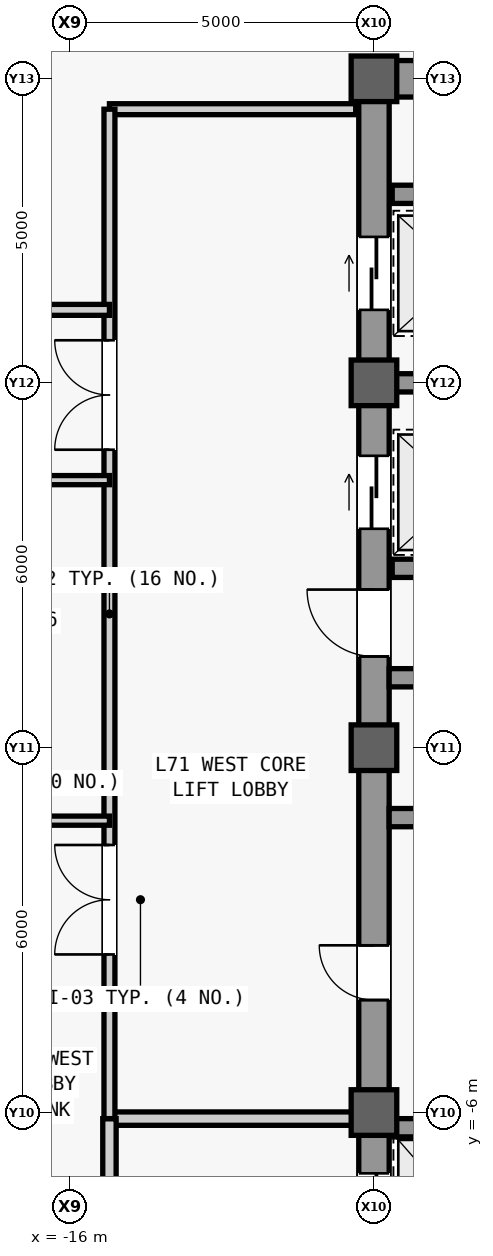
"""IFC4 building model, lengths in metres.
Left out: names, types, materials, properties, quantities, classifications, styles, units other than length and angle.
Written with IfcOpenShell. Run it as: python <this file> out.ifc"""

import sys

from ifc_helpers import new_model, si_unit, direction, frame, frame_2d, origin, origin_2d, place, context, subcontext, project, spatial, rectangle, extrude, source, transform, mapped, element, fill, save


model = new_model("IFC4")
c1 = context("Model", 3, precision=1e-05, world=origin(), true_north=direction((0.0, 1.0)))
c2 = subcontext(c1, "Body", "Model", "MODEL_VIEW")
j1 = project(units=[si_unit("LENGTHUNIT", "METRE"), si_unit("PLANEANGLEUNIT", "RADIAN")], contexts=[c1])
p1 = place(None, origin())
s1 = spatial("IfcSite", under=j1, at=p1, CompositionType="ELEMENT")
p2 = place(p1, origin())
s2 = spatial("IfcBuilding", under=s1, at=p2, CompositionType="ELEMENT")
p3 = place(p2, frame((0.0, 0.0, 301.5)))
s3 = spatial("IfcBuildingStorey", under=s2, at=p3, CompositionType="ELEMENT", Elevation=301.5)
m1 = source(origin(), c2, "Body", "SweptSolid", [
    extrude(rectangle(XDim=22.0, YDim=0.5, at=frame_2d((11.0, 0.0))), origin(), (0.0, 0.0, 1.0), 3.78),
])
p4 = place(p3, frame((-11.0, -11.0, 0.0), z_axis=(0.0, 0.0, 1.0), x_axis=(0.0, 1.0, 0.0)))
e1 = element("IfcWall", 1, at=p4, inside=s3, PredefinedType="SHEAR", context=c2, shape_type="MappedRepresentation", body=[
    mapped(m1, transform((0.0, 0.0, 0.0), scale=1.0)),
])
m2 = source(origin(), c2, "Body", "SweptSolid", [
    extrude(rectangle(XDim=1.1, YDim=2.2, at=frame_2d((0.55, 1.1))), frame((0.0, 0.26, 0.0), z_axis=(0.0, -1.0, 0.0), x_axis=(1.0, 0.0, 0.0)), (0.0, 0.0, 1.0), 0.52),
])
p5 = place(p4, frame((0.8, 0.0, 0.0)))
e2 = element("IfcOpeningElement", 2, at=p5, cuts=e1, PredefinedType="OPENING", context=c2, shape_type="MappedRepresentation", body=[
    mapped(m2, transform((0.0, 0.0, 0.0), scale=1.0)),
])
p6 = place(p4, frame((12.5, 0.0, 0.0)))
e3 = element("IfcOpeningElement", 3, at=p6, cuts=e1, PredefinedType="OPENING", context=c2, shape_type="MappedRepresentation", body=[
    mapped(m2, transform((0.0, 0.0, 0.0), scale=1.0)),
])
m3 = source(origin(), c2, "Body", "SweptSolid", [
    extrude(rectangle(XDim=0.9, YDim=2.15, at=frame_2d((0.45, 1.075))), frame((0.0, 0.26, 0.0), z_axis=(0.0, -1.0, 0.0), x_axis=(1.0, 0.0, 0.0)), (0.0, 0.0, 1.0), 0.52),
])
p7 = place(p4, frame((6.85, 0.0, 0.0)))
e4 = element("IfcOpeningElement", 4, at=p7, cuts=e1, PredefinedType="OPENING", context=c2, shape_type="MappedRepresentation", body=[
    mapped(m3, transform((0.0, 0.0, 0.0), scale=1.0)),
])
m4 = source(origin(), c2, "Body", "SweptSolid", [
    extrude(rectangle(XDim=1.2, YDim=2.3, at=frame_2d((0.6, 1.15))), frame((0.0, 0.26, 0.0), z_axis=(0.0, -1.0, 0.0), x_axis=(1.0, 0.0, 0.0)), (0.0, 0.0, 1.0), 0.52),
])
p8 = place(p4, frame((14.6, 0.0, 0.0)))
e5 = element("IfcOpeningElement", 5, at=p8, cuts=e1, PredefinedType="OPENING", context=c2, shape_type="MappedRepresentation", body=[
    mapped(m4, transform((0.0, 0.0, 0.0), scale=1.0)),
])
p9 = place(p4, frame((18.2, 0.0, 0.0)))
e6 = element("IfcOpeningElement", 6, at=p9, cuts=e1, PredefinedType="OPENING", context=c2, shape_type="MappedRepresentation", body=[
    mapped(m4, transform((0.0, 0.0, 0.0), scale=1.0)),
])
m5 = source(origin(), c2, "Body", "SweptSolid", [
    extrude(rectangle(XDim=1.3, YDim=2.3, at=frame_2d((0.65, 1.15))), frame((0.0, 0.26, 0.0), z_axis=(0.0, -1.0, 0.0), x_axis=(1.0, 0.0, 0.0)), (0.0, 0.0, 1.0), 0.52),
])
p10 = place(p4, frame((2.7, 0.0, 0.0)))
e7 = element("IfcOpeningElement", 7, at=p10, cuts=e1, PredefinedType="OPENING", context=c2, shape_type="MappedRepresentation", body=[
    mapped(m5, transform((0.0, 0.0, 0.0), scale=1.0)),
])
m6 = source(origin(), c2, "Body", "SweptSolid", [
    extrude(rectangle(XDim=5.9, YDim=0.6, at=frame_2d((2.95, 0.0))), origin(), (0.0, 0.0, 1.0), 3.78),
])
p11 = place(p3, frame((-10.75, 11.0, 0.0), z_axis=(0.0, 0.0, 1.0), x_axis=(1.0, 0.0, 0.0)))
e8 = element("IfcWall", 8, at=p11, inside=s3, PredefinedType="SHEAR", context=c2, shape_type="MappedRepresentation", body=[
    mapped(m6, transform((0.0, 0.0, 0.0), scale=1.0)),
])
m7 = source(origin(), c2, "Body", "SweptSolid", [
    extrude(rectangle(XDim=5.65, YDim=0.3, at=frame_2d((2.825, 0.0))), origin(), (0.0, 0.0, 1.0), 3.78),
])
for number, where, z_axis, x_axis in (
    (9, (-10.75, -1.15, 0.0), (0.0, 0.0, 1.0), (1.0, 0.0, 0.0)),
    (10, (-10.75, 1.15, 0.0), (0.0, 0.0, 1.0), (1.0, 0.0, 0.0)),
):
    element("IfcWall", number, at=place(p3, frame(where, z_axis=z_axis, x_axis=x_axis)), inside=s3, PredefinedType="SHEAR", context=c2, shape_type="MappedRepresentation", body=[
        mapped(m7, transform((0.0, 0.0, 0.0), scale=1.0)),
    ])
m8 = source(origin(), c2, "Body", "SweptSolid", [
    extrude(rectangle(XDim=0.75, YDim=0.75, at=origin_2d()), origin(), (0.0, 0.0, 1.0), 4.0),
])
for number, where, z_axis, x_axis in (
    (11, (-11.0, -6.0, 0.0), (0.0, 0.0, 1.0), (1.0, 0.0, 0.0)),
    (12, (-11.0, 0.0, 0.0), (0.0, 0.0, 1.0), (1.0, 0.0, 0.0)),
    (13, (-11.0, 6.0, 0.0), (0.0, 0.0, 1.0), (1.0, 0.0, 0.0)),
    (14, (-11.0, 11.0, 0.0), (0.0, 0.0, 1.0), (1.0, 0.0, 0.0)),
):
    element("IfcColumn", number, at=place(p3, frame(where, z_axis=z_axis, x_axis=x_axis)), inside=s3, PredefinedType="COLUMN", context=c2, shape_type="MappedRepresentation", body=[
        mapped(m8, transform((0.0, 0.0, 0.0), scale=1.0)),
    ])
m9 = source(origin(), c2, "Body", "SweptSolid", [
    extrude(rectangle(XDim=2.2, YDim=0.3, at=frame_2d((1.1, 0.0))), origin(), (0.0, 0.0, 1.0), 3.78),
])
for number, where, z_axis, x_axis in (
    (15, (-10.7, -6.25, 0.0), (0.0, 0.0, 1.0), (1.0, 0.0, 0.0)),
    (16, (-10.7, 2.95, 0.0), (0.0, 0.0, 1.0), (1.0, 0.0, 0.0)),
    (17, (-10.7, 6.0, 0.0), (0.0, 0.0, 1.0), (1.0, 0.0, 0.0)),
    (18, (-10.7, 9.1, 0.0), (0.0, 0.0, 1.0), (1.0, 0.0, 0.0)),
):
    element("IfcWall", number, at=place(p3, frame(where, z_axis=z_axis, x_axis=x_axis)), inside=s3, PredefinedType="SHEAR", context=c2, shape_type="MappedRepresentation", body=[
        mapped(m9, transform((0.0, 0.0, 0.0), scale=1.0)),
    ])
m10 = source(origin(), c2, "Body", "SweptSolid", [
    extrude(rectangle(XDim=4.05, YDim=0.22, at=frame_2d((2.025, 0.0))), origin(), (0.0, 0.0, 1.0), 3.085),
])
p12 = place(p3, frame((-15.35, -6.1, 0.0), z_axis=(0.0, 0.0, 1.0), x_axis=(1.0, 0.0, 0.0)))
e19 = element("IfcWall", 19, at=p12, inside=s3, PredefinedType="PARTITIONING", context=c2, shape_type="MappedRepresentation", body=[
    mapped(m10, transform((0.0, 0.0, 0.0), scale=1.0)),
])
m11 = source(origin(), c2, "Body", "SweptSolid", [
    extrude(rectangle(XDim=4.4, YDim=0.22, at=frame_2d((2.2, 0.0))), origin(), (0.0, 0.0, 1.0), 3.78),
])
p13 = place(p3, frame((-15.35, -10.5, 0.0), z_axis=(0.0, 0.0, 1.0), x_axis=(0.0, 1.0, 0.0)))
e20 = element("IfcWall", 20, at=p13, inside=s3, PredefinedType="PARTITIONING", context=c2, shape_type="MappedRepresentation", body=[
    mapped(m11, transform((0.0, 0.0, 0.0), scale=1.0)),
])
m12 = source(origin(), c2, "Body", "SweptSolid", [
    extrude(rectangle(XDim=1.2, YDim=2.2, at=frame_2d((0.6, 1.1))), frame((0.0, 0.12, 0.0), z_axis=(0.0, -1.0, 0.0), x_axis=(1.0, 0.0, 0.0)), (0.0, 0.0, 1.0), 0.24),
])
p14 = place(p13, frame((1.6, 0.0, 0.0)))
e21 = element("IfcOpeningElement", 21, at=p14, cuts=e20, PredefinedType="OPENING", context=c2, shape_type="MappedRepresentation", body=[
    mapped(m12, transform((0.0, 0.0, 0.0), scale=1.0)),
])
m13 = source(origin(), c2, "Body", "SweptSolid", [
    extrude(rectangle(XDim=4.05, YDim=0.18, at=frame_2d((2.025, 0.0))), origin(), (0.0, 0.0, 1.0), 3.78),
])
p15 = place(p3, frame((-15.35, 10.5, 0.0), z_axis=(0.0, 0.0, 1.0), x_axis=(1.0, 0.0, 0.0)))
e22 = element("IfcWall", 22, at=p15, inside=s3, PredefinedType="PARTITIONING", context=c2, shape_type="MappedRepresentation", body=[
    mapped(m13, transform((0.0, 0.0, 0.0), scale=1.0)),
])
m14 = source(origin(), c2, "Body", "SweptSolid", [
    extrude(rectangle(XDim=16.6, YDim=0.18, at=frame_2d((8.3, 0.0))), origin(), (0.0, 0.0, 1.0), 3.78),
])
p16 = place(p3, frame((-15.35, -6.1, 0.0), z_axis=(0.0, 0.0, 1.0), x_axis=(0.0, 1.0, 0.0)))
e23 = element("IfcWall", 23, at=p16, inside=s3, PredefinedType="PARTITIONING", context=c2, shape_type="MappedRepresentation", body=[
    mapped(m14, transform((0.0, 0.0, 0.0), scale=1.0)),
])
m15 = source(origin(), c2, "Body", "SweptSolid", [
    extrude(rectangle(XDim=1.8, YDim=2.25, at=frame_2d((0.9, 1.125))), frame((0.0, 0.1, 0.0), z_axis=(0.0, -1.0, 0.0), x_axis=(1.0, 0.0, 0.0)), (0.0, 0.0, 1.0), 0.2),
])
p17 = place(p16, frame((2.7, 0.0, 0.0)))
e24 = element("IfcOpeningElement", 24, at=p17, cuts=e23, PredefinedType="OPENING", context=c2, shape_type="MappedRepresentation", body=[
    mapped(m15, transform((0.0, 0.0, 0.0), scale=1.0)),
])
p18 = place(p16, frame((11.0, 0.0, 0.0)))
e25 = element("IfcOpeningElement", 25, at=p18, cuts=e23, PredefinedType="OPENING", context=c2, shape_type="MappedRepresentation", body=[
    mapped(m15, transform((0.0, 0.0, 0.0), scale=1.0)),
])
m16 = source(origin(), c2, "Body", "SweptSolid", [
    extrude(rectangle(XDim=2.05, YDim=0.15, at=frame_2d((1.025, 0.0))), origin(), (0.0, 0.0, 1.0), 3.78),
])
for number, where, z_axis, x_axis in (
    (26, (-17.4, -1.2, 0.0), (0.0, 0.0, 1.0), (1.0, 0.0, 0.0)),
    (27, (-17.4, 4.4, 0.0), (0.0, 0.0, 1.0), (1.0, 0.0, 0.0)),
):
    element("IfcWall", number, at=place(p3, frame(where, z_axis=z_axis, x_axis=x_axis)), inside=s3, PredefinedType="PARTITIONING", context=c2, shape_type="MappedRepresentation", body=[
        mapped(m16, transform((0.0, 0.0, 0.0), scale=1.0)),
    ])
m17 = source(origin(), c2, "Body", "SweptSolid", [
    extrude(rectangle(XDim=2.05, YDim=0.18, at=frame_2d((1.025, 0.0))), origin(), (0.0, 0.0, 1.0), 3.78),
])
p19 = place(p3, frame((-17.4, 7.2, 0.0), z_axis=(0.0, 0.0, 1.0), x_axis=(1.0, 0.0, 0.0)))
e28 = element("IfcWall", 28, at=p19, inside=s3, PredefinedType="PARTITIONING", context=c2, shape_type="MappedRepresentation", body=[
    mapped(m17, transform((0.0, 0.0, 0.0), scale=1.0)),
])
m18 = source(origin(), c2, "Body", "SweptSolid", [
    extrude(rectangle(XDim=1.1, YDim=2.2, at=frame_2d((0.55, 1.1))), frame((0.0, 0.025, 0.0), z_axis=(0.0, -1.0, 0.0), x_axis=(1.0, 0.0, 0.0)), (0.0, 0.0, 1.0), 0.05),
])
p20 = place(p6, origin())
e29 = element("IfcDoor", 29, at=p20, inside=s3, OperationType="SINGLE_SWING_RIGHT", PredefinedType="DOOR", context=c2, shape_type="MappedRepresentation", body=[
    mapped(m18, transform((0.0, 0.0, 0.0), scale=1.0)),
])
fill(e3, e29)
m19 = source(origin(), c2, "Body", "SweptSolid", [
    extrude(rectangle(XDim=0.9, YDim=2.15, at=frame_2d((0.45, 1.075))), frame((0.0, 0.025, 0.0), z_axis=(0.0, -1.0, 0.0), x_axis=(1.0, 0.0, 0.0)), (0.0, 0.0, 1.0), 0.05),
])
p21 = place(p7, origin())
e30 = element("IfcDoor", 30, at=p21, inside=s3, OperationType="SINGLE_SWING_RIGHT", PredefinedType="DOOR", context=c2, shape_type="MappedRepresentation", body=[
    mapped(m19, transform((0.0, 0.0, 0.0), scale=1.0)),
])
fill(e4, e30)
m20 = source(origin(), c2, "Body", "SweptSolid", [
    extrude(rectangle(XDim=1.8, YDim=2.25, at=frame_2d((0.9, 1.125))), frame((0.0, 0.025, 0.0), z_axis=(0.0, -1.0, 0.0), x_axis=(1.0, 0.0, 0.0)), (0.0, 0.0, 1.0), 0.05),
])
p22 = place(p17, origin())
e31 = element("IfcDoor", 31, at=p22, inside=s3, OperationType="SINGLE_SWING_LEFT", PredefinedType="DOOR", context=c2, shape_type="MappedRepresentation", body=[
    mapped(m20, transform((0.0, 0.0, 0.0), scale=1.0)),
])
fill(e24, e31)
p23 = place(p18, origin())
e32 = element("IfcDoor", 32, at=p23, inside=s3, OperationType="SINGLE_SWING_RIGHT", PredefinedType="DOOR", context=c2, shape_type="MappedRepresentation", body=[
    mapped(m20, transform((0.0, 0.0, 0.0), scale=1.0)),
])
fill(e25, e32)
m21 = source(origin(), c2, "Body", "SweptSolid", [
    extrude(rectangle(XDim=1.2, YDim=2.3, at=frame_2d((0.6, 1.15))), frame((0.0, 0.025, 0.0), z_axis=(0.0, -1.0, 0.0), x_axis=(1.0, 0.0, 0.0)), (0.0, 0.0, 1.0), 0.05),
])
p24 = place(p8, origin())
e33 = element("IfcDoor", 33, at=p24, inside=s3, OperationType="SLIDING_TO_LEFT", PredefinedType="DOOR", context=c2, shape_type="MappedRepresentation", body=[
    mapped(m21, transform((0.0, 0.0, 0.0), scale=1.0)),
])
fill(e5, e33)
p25 = place(p9, origin())
e34 = element("IfcDoor", 34, at=p25, inside=s3, OperationType="SLIDING_TO_LEFT", PredefinedType="DOOR", context=c2, shape_type="MappedRepresentation", body=[
    mapped(m21, transform((0.0, 0.0, 0.0), scale=1.0)),
])
fill(e6, e34)
m22 = source(origin(), c2, "Body", "SweptSolid", [
    extrude(rectangle(XDim=1.3, YDim=2.3, at=frame_2d((0.65, 1.15))), frame((0.0, 0.025, 0.0), z_axis=(0.0, -1.0, 0.0), x_axis=(1.0, 0.0, 0.0)), (0.0, 0.0, 1.0), 0.05),
])
p26 = place(p10, origin())
e35 = element("IfcDoor", 35, at=p26, inside=s3, OperationType="SLIDING_TO_LEFT", PredefinedType="DOOR", context=c2, shape_type="MappedRepresentation", body=[
    mapped(m22, transform((0.0, 0.0, 0.0), scale=1.0)),
])
fill(e7, e35)
save(model, sys.argv[1])
